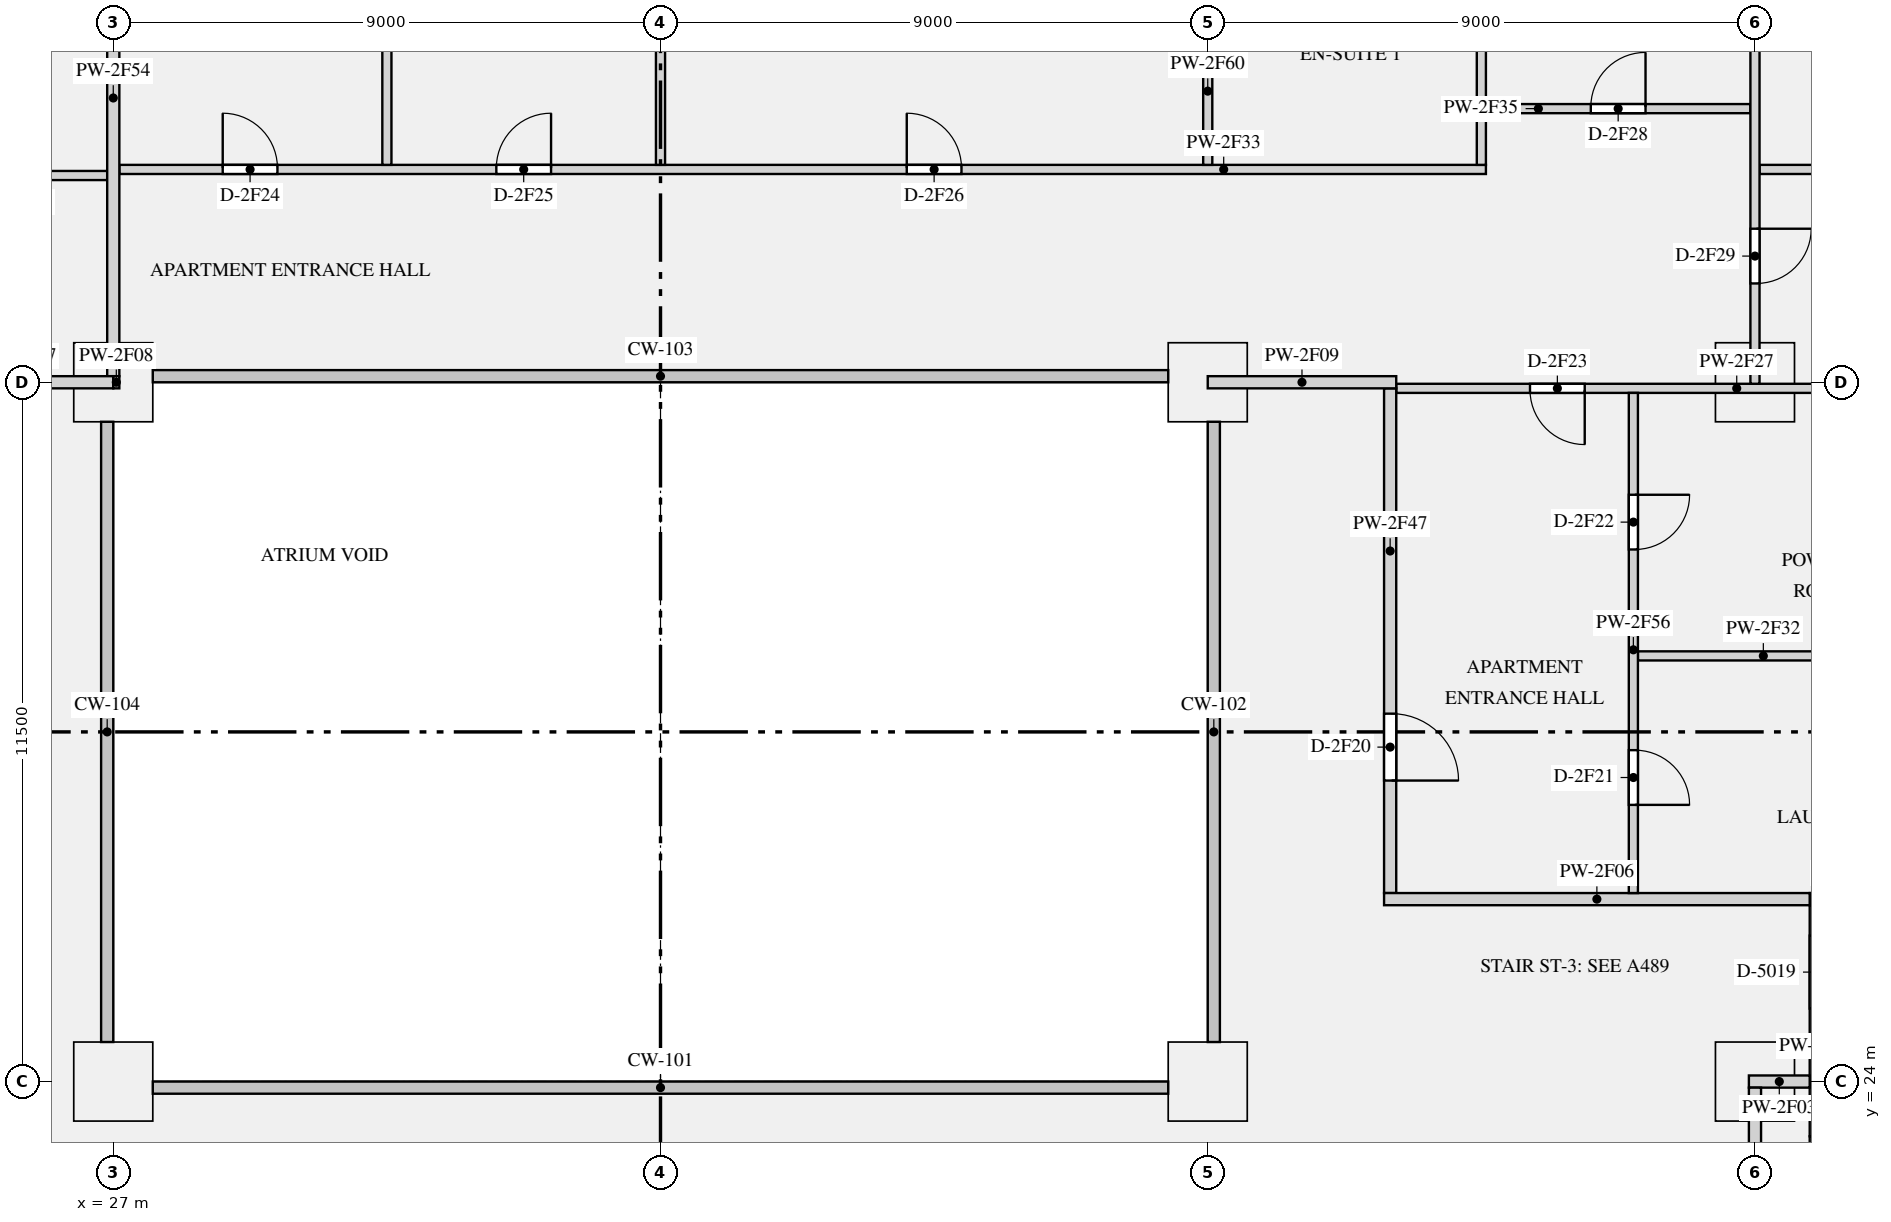
"""IFC4 building model, lengths in metres.
Left out: names, types, materials, properties, quantities, classifications, styles, units other than length and angle.
Written with IfcOpenShell. Run it as: python <this file> out.ifc"""

import sys

from ifc_helpers import new_model, si_unit, direction, frame, frame_2d, origin, origin_2d, place, context, subcontext, project, spatial, rectangle, extrude, element, fill, save


model = new_model("IFC4")
c1 = context("Model", 3, precision=1e-05, world=origin(), true_north=direction((0.0, 1.0)))
c2 = subcontext(c1, "Body", "Model", "MODEL_VIEW")
j1 = project(units=[si_unit("LENGTHUNIT", "METRE"), si_unit("PLANEANGLEUNIT", "RADIAN")], contexts=[c1])
p1 = place(None, origin())
s1 = spatial("IfcSite", under=j1, at=p1, CompositionType="ELEMENT")
p2 = place(p1, origin())
s2 = spatial("IfcBuilding", under=s1, at=p2, CompositionType="ELEMENT")
p3 = place(p2, frame((0.0, 0.0, 127.65)))
s3 = spatial("IfcBuildingStorey", under=s2, at=p3, CompositionType="ELEMENT", Elevation=127.65)
for number, where, z_axis, x_axis in (
    (1, (27.0, 24.0, 0.0), (0.0, 0.0, 1.0), (1.0, 0.0, 0.0)),
    (2, (45.0, 24.0, 0.0), (0.0, 0.0, 1.0), (1.0, 0.0, 0.0)),
    (3, (54.0, 24.0, 0.0), (0.0, 0.0, 1.0), (1.0, 0.0, 0.0)),
    (4, (27.0, 35.5, 0.0), (0.0, 0.0, 1.0), (1.0, 0.0, 0.0)),
    (5, (45.0, 35.5, 0.0), (0.0, 0.0, 1.0), (1.0, 0.0, 0.0)),
    (6, (54.0, 35.5, 0.0), (0.0, 0.0, 1.0), (1.0, 0.0, 0.0)),
):
    element("IfcColumn", number, at=place(p3, frame(where, z_axis=z_axis, x_axis=x_axis)), inside=s3, PredefinedType="COLUMN", context=c2, shape_type="SweptSolid", body=[
        extrude(rectangle(XDim=1.3, YDim=1.3, at=origin_2d()), origin(), (0.0, 0.0, 1.0), 3.15),
    ])
p4 = place(p3, frame((54.9, 23.0, 0.0), z_axis=(0.0, 0.0, 1.0), x_axis=(1.0, 0.0, 0.0)))
e7 = element("IfcWall", 7, at=p4, inside=s3, PredefinedType="PARTITIONING", context=c2, shape_type="SweptSolid", body=[
    extrude(rectangle(XDim=5.0, YDim=0.2, at=frame_2d((2.5, 0.0))), origin(), (0.0, 0.0, 1.0), 2.65),
])
p5 = place(p3, frame((54.9, 27.0, 0.0), z_axis=(0.0, 0.0, 1.0), x_axis=(1.0, 0.0, 0.0)))
e8 = element("IfcWall", 8, at=p5, inside=s3, PredefinedType="PARTITIONING", context=c2, shape_type="SweptSolid", body=[
    extrude(rectangle(XDim=1.3, YDim=0.2, at=frame_2d((0.65, 0.0))), origin(), (0.0, 0.0, 1.0), 2.65),
])
p6 = place(p3, frame((55.0, 23.1, 0.0), z_axis=(0.0, 0.0, 1.0), x_axis=(0.0, 1.0, 0.0)))
e9 = element("IfcWall", 9, at=p6, inside=s3, PredefinedType="PARTITIONING", context=c2, shape_type="SweptSolid", body=[
    extrude(rectangle(XDim=3.8, YDim=0.2, at=frame_2d((1.9, 0.0))), origin(), (0.0, 0.0, 1.0), 2.65),
])
p7 = place(p6, frame((2.1, 0.0, 0.0)))
e10 = element("IfcOpeningElement", 10, at=p7, cuts=e9, PredefinedType="OPENING", context=c2, shape_type="SweptSolid", body=[
    extrude(rectangle(XDim=1.2, YDim=2.1, at=frame_2d((0.6, 1.05))), frame((0.0, 0.11, 0.0), z_axis=(0.0, -1.0, 0.0), x_axis=(1.0, 0.0, 0.0)), (0.0, 0.0, 1.0), 0.22),
])
p8 = place(p3, frame((53.9, 24.0, 0.0), z_axis=(0.0, 0.0, 1.0), x_axis=(1.0, 0.0, 0.0)))
e11 = element("IfcWall", 11, at=p8, inside=s3, PredefinedType="PARTITIONING", context=c2, shape_type="SweptSolid", body=[
    extrude(rectangle(XDim=1.0, YDim=0.2, at=frame_2d((0.5, 0.0))), origin(), (0.0, 0.0, 1.0), 2.65),
])
p9 = place(p3, frame((47.9, 27.0, 0.0), z_axis=(0.0, 0.0, 1.0), x_axis=(1.0, 0.0, 0.0)))
e12 = element("IfcWall", 12, at=p9, inside=s3, PredefinedType="PARTITIONING", context=c2, shape_type="SweptSolid", body=[
    extrude(rectangle(XDim=7.0, YDim=0.2, at=frame_2d((3.5, 0.0))), origin(), (0.0, 0.0, 1.0), 2.65),
])
p10 = place(p3, frame((23.9, 35.5, 0.0), z_axis=(0.0, 0.0, 1.0), x_axis=(1.0, 0.0, 0.0)))
e13 = element("IfcWall", 13, at=p10, inside=s3, PredefinedType="PARTITIONING", context=c2, shape_type="SweptSolid", body=[
    extrude(rectangle(XDim=3.1, YDim=0.2, at=frame_2d((1.55, 0.0))), origin(), (0.0, 0.0, 1.0), 2.65),
])
p11 = place(p3, frame((27.0, 35.5, 0.0), z_axis=(0.0, 0.0, 1.0), x_axis=(1.0, 0.0, 0.0)))
e14 = element("IfcWall", 14, at=p11, inside=s3, PredefinedType="PARTITIONING", context=c2, shape_type="SweptSolid", body=[
    extrude(rectangle(XDim=0.1, YDim=0.2, at=frame_2d((0.05, 0.0))), origin(), (0.0, 0.0, 1.0), 2.65),
])
p12 = place(p3, frame((45.0, 35.5, 0.0), z_axis=(0.0, 0.0, 1.0), x_axis=(1.0, 0.0, 0.0)))
e15 = element("IfcWall", 15, at=p12, inside=s3, PredefinedType="PARTITIONING", context=c2, shape_type="SweptSolid", body=[
    extrude(rectangle(XDim=3.1, YDim=0.2, at=frame_2d((1.55, 0.0))), origin(), (0.0, 0.0, 1.0), 2.65),
])
p13 = place(p3, frame((12.125, 38.9, 0.0), z_axis=(0.0, 0.0, 1.0), x_axis=(1.0, 0.0, 0.0)))
e16 = element("IfcWall", 16, at=p13, inside=s3, PredefinedType="PARTITIONING", context=c2, shape_type="SweptSolid", body=[
    extrude(rectangle(XDim=14.775, YDim=0.15, at=frame_2d((7.387, 0.0))), origin(), (0.0, 0.0, 1.0), 2.65),
])
p14 = place(p13, frame((3.175, 0.0, 0.0)))
e17 = element("IfcOpeningElement", 17, at=p14, cuts=e16, PredefinedType="OPENING", context=c2, shape_type="SweptSolid", body=[
    extrude(rectangle(XDim=0.9, YDim=2.1, at=frame_2d((0.45, 1.05))), frame((0.0, 0.085, 0.0), z_axis=(0.0, -1.0, 0.0), x_axis=(1.0, 0.0, 0.0)), (0.0, 0.0, 1.0), 0.17),
])
p15 = place(p13, frame((12.925, 0.0, 0.0)))
e18 = element("IfcOpeningElement", 18, at=p15, cuts=e16, PredefinedType="OPENING", context=c2, shape_type="SweptSolid", body=[
    extrude(rectangle(XDim=0.9, YDim=2.1, at=frame_2d((0.45, 1.05))), frame((0.0, 0.085, 0.0), z_axis=(0.0, -1.0, 0.0), x_axis=(1.0, 0.0, 0.0)), (0.0, 0.0, 1.0), 0.17),
])
p16 = place(p3, frame((48.1, 35.4, 0.0), z_axis=(0.0, 0.0, 1.0), x_axis=(1.0, 0.0, 0.0)))
e19 = element("IfcWall", 19, at=p16, inside=s3, PredefinedType="PARTITIONING", context=c2, shape_type="SweptSolid", body=[
    extrude(rectangle(XDim=8.1, YDim=0.15, at=frame_2d((4.05, 0.0))), origin(), (0.0, 0.0, 1.0), 2.65),
])
p17 = place(p16, frame((2.2, 0.0, 0.0)))
e20 = element("IfcOpeningElement", 20, at=p17, cuts=e19, PredefinedType="OPENING", context=c2, shape_type="SweptSolid", body=[
    extrude(rectangle(XDim=0.9, YDim=2.1, at=frame_2d((0.45, 1.05))), frame((0.0, 0.085, 0.0), z_axis=(0.0, -1.0, 0.0), x_axis=(1.0, 0.0, 0.0)), (0.0, 0.0, 1.0), 0.17),
])
p18 = place(p3, frame((52.075, 31.0, 0.0), z_axis=(0.0, 0.0, 1.0), x_axis=(1.0, 0.0, 0.0)))
e21 = element("IfcWall", 21, at=p18, inside=s3, PredefinedType="PARTITIONING", context=c2, shape_type="SweptSolid", body=[
    extrude(rectangle(XDim=4.125, YDim=0.15, at=frame_2d((2.062, 0.0))), origin(), (0.0, 0.0, 1.0), 2.65),
])
p19 = place(p3, frame((27.1, 39.0, 0.0), z_axis=(0.0, 0.0, 1.0), x_axis=(1.0, 0.0, 0.0)))
e22 = element("IfcWall", 22, at=p19, inside=s3, PredefinedType="PARTITIONING", context=c2, shape_type="SweptSolid", body=[
    extrude(rectangle(XDim=22.475, YDim=0.15, at=frame_2d((11.237, 0.0))), origin(), (0.0, 0.0, 1.0), 2.65),
])
p20 = place(p19, frame((1.7, 0.0, 0.0)))
e23 = element("IfcOpeningElement", 23, at=p20, cuts=e22, PredefinedType="OPENING", context=c2, shape_type="SweptSolid", body=[
    extrude(rectangle(XDim=0.9, YDim=2.1, at=frame_2d((0.45, 1.05))), frame((0.0, 0.085, 0.0), z_axis=(0.0, -1.0, 0.0), x_axis=(1.0, 0.0, 0.0)), (0.0, 0.0, 1.0), 0.17),
])
p21 = place(p19, frame((6.2, 0.0, 0.0)))
e24 = element("IfcOpeningElement", 24, at=p21, cuts=e22, PredefinedType="OPENING", context=c2, shape_type="SweptSolid", body=[
    extrude(rectangle(XDim=0.9, YDim=2.1, at=frame_2d((0.45, 1.05))), frame((0.0, 0.085, 0.0), z_axis=(0.0, -1.0, 0.0), x_axis=(1.0, 0.0, 0.0)), (0.0, 0.0, 1.0), 0.17),
])
p22 = place(p19, frame((12.95, 0.0, 0.0)))
e25 = element("IfcOpeningElement", 25, at=p22, cuts=e22, PredefinedType="OPENING", context=c2, shape_type="SweptSolid", body=[
    extrude(rectangle(XDim=0.9, YDim=2.1, at=frame_2d((0.45, 1.05))), frame((0.0, 0.085, 0.0), z_axis=(0.0, -1.0, 0.0), x_axis=(1.0, 0.0, 0.0)), (0.0, 0.0, 1.0), 0.17),
])
p23 = place(p3, frame((54.075, 39.0, 0.0), z_axis=(0.0, 0.0, 1.0), x_axis=(1.0, 0.0, 0.0)))
e26 = element("IfcWall", 26, at=p23, inside=s3, PredefinedType="PARTITIONING", context=c2, shape_type="SweptSolid", body=[
    extrude(rectangle(XDim=8.85, YDim=0.15, at=frame_2d((4.425, 0.0))), origin(), (0.0, 0.0, 1.0), 2.65),
])
p24 = place(p23, frame((3.975, 0.0, 0.0)))
e27 = element("IfcOpeningElement", 27, at=p24, cuts=e26, PredefinedType="OPENING", context=c2, shape_type="SweptSolid", body=[
    extrude(rectangle(XDim=0.9, YDim=2.1, at=frame_2d((0.45, 1.05))), frame((0.0, 0.085, 0.0), z_axis=(0.0, -1.0, 0.0), x_axis=(1.0, 0.0, 0.0)), (0.0, 0.0, 1.0), 0.17),
])
p25 = place(p3, frame((49.575, 40.0, 0.0), z_axis=(0.0, 0.0, 1.0), x_axis=(1.0, 0.0, 0.0)))
e28 = element("IfcWall", 28, at=p25, inside=s3, PredefinedType="PARTITIONING", context=c2, shape_type="SweptSolid", body=[
    extrude(rectangle(XDim=4.35, YDim=0.15, at=frame_2d((2.175, 0.0))), origin(), (0.0, 0.0, 1.0), 2.65),
])
p26 = place(p25, frame((1.725, 0.0, 0.0)))
e29 = element("IfcOpeningElement", 29, at=p26, cuts=e28, PredefinedType="OPENING", context=c2, shape_type="SweptSolid", body=[
    extrude(rectangle(XDim=0.9, YDim=2.1, at=frame_2d((0.45, 1.05))), frame((0.0, 0.085, 0.0), z_axis=(0.0, -1.0, 0.0), x_axis=(1.0, 0.0, 0.0)), (0.0, 0.0, 1.0), 0.17),
])
p27 = place(p3, frame((54.0, 35.475, 0.0), z_axis=(0.0, 0.0, 1.0), x_axis=(0.0, 1.0, 0.0)))
e30 = element("IfcWall", 30, at=p27, inside=s3, PredefinedType="PARTITIONING", context=c2, shape_type="SweptSolid", body=[
    extrude(rectangle(XDim=9.275, YDim=0.15, at=frame_2d((4.637, 0.0))), origin(), (0.0, 0.0, 1.0), 2.65),
])
p28 = place(p27, frame((1.65, 0.0, 0.0)))
e31 = element("IfcOpeningElement", 31, at=p28, cuts=e30, PredefinedType="OPENING", context=c2, shape_type="SweptSolid", body=[
    extrude(rectangle(XDim=0.9, YDim=2.1, at=frame_2d((0.45, 1.05))), frame((0.0, 0.085, 0.0), z_axis=(0.0, -1.0, 0.0), x_axis=(1.0, 0.0, 0.0)), (0.0, 0.0, 1.0), 0.17),
])
p29 = place(p3, frame((54.0, 16.1, 0.0), z_axis=(0.0, 0.0, 1.0), x_axis=(0.0, 1.0, 0.0)))
e32 = element("IfcWall", 32, at=p29, inside=s3, PredefinedType="PARTITIONING", context=c2, shape_type="SweptSolid", body=[
    extrude(rectangle(XDim=7.8, YDim=0.2, at=frame_2d((3.9, 0.0))), origin(), (0.0, 0.0, 1.0), 2.65),
])
p30 = place(p29, frame((2.35, 0.0, 0.0)))
e33 = element("IfcOpeningElement", 33, at=p30, cuts=e32, PredefinedType="OPENING", context=c2, shape_type="SweptSolid", body=[
    extrude(rectangle(XDim=1.1, YDim=2.1, at=frame_2d((0.55, 1.05))), frame((0.0, 0.11, 0.0), z_axis=(0.0, -1.0, 0.0), x_axis=(1.0, 0.0, 0.0)), (0.0, 0.0, 1.0), 0.22),
])
p31 = place(p3, frame((48.0, 27.1, 0.0), z_axis=(0.0, 0.0, 1.0), x_axis=(0.0, 1.0, 0.0)))
e34 = element("IfcWall", 34, at=p31, inside=s3, PredefinedType="PARTITIONING", context=c2, shape_type="SweptSolid", body=[
    extrude(rectangle(XDim=8.3, YDim=0.2, at=frame_2d((4.15, 0.0))), origin(), (0.0, 0.0, 1.0), 2.65),
])
p32 = place(p31, frame((1.85, 0.0, 0.0)))
e35 = element("IfcOpeningElement", 35, at=p32, cuts=e34, PredefinedType="OPENING", context=c2, shape_type="SweptSolid", body=[
    extrude(rectangle(XDim=1.1, YDim=2.1, at=frame_2d((0.55, 1.05))), frame((0.0, 0.11, 0.0), z_axis=(0.0, -1.0, 0.0), x_axis=(1.0, 0.0, 0.0)), (0.0, 0.0, 1.0), 0.22),
])
p33 = place(p3, frame((27.0, 35.6, 0.0), z_axis=(0.0, 0.0, 1.0), x_axis=(0.0, 1.0, 0.0)))
e36 = element("IfcWall", 36, at=p33, inside=s3, PredefinedType="PARTITIONING", context=c2, shape_type="SweptSolid", body=[
    extrude(rectangle(XDim=9.15, YDim=0.2, at=frame_2d((4.575, 0.0))), origin(), (0.0, 0.0, 1.0), 2.65),
])
p34 = place(p3, frame((52.0, 27.1, 0.0), z_axis=(0.0, 0.0, 1.0), x_axis=(0.0, 1.0, 0.0)))
e37 = element("IfcWall", 37, at=p34, inside=s3, PredefinedType="PARTITIONING", context=c2, shape_type="SweptSolid", body=[
    extrude(rectangle(XDim=8.225, YDim=0.15, at=frame_2d((4.112, 0.0))), origin(), (0.0, 0.0, 1.0), 2.65),
])
p35 = place(p34, frame((1.45, 0.0, 0.0)))
e38 = element("IfcOpeningElement", 38, at=p35, cuts=e37, PredefinedType="OPENING", context=c2, shape_type="SweptSolid", body=[
    extrude(rectangle(XDim=0.9, YDim=2.1, at=frame_2d((0.45, 1.05))), frame((0.0, 0.085, 0.0), z_axis=(0.0, -1.0, 0.0), x_axis=(1.0, 0.0, 0.0)), (0.0, 0.0, 1.0), 0.17),
])
p36 = place(p34, frame((5.65, 0.0, 0.0)))
e39 = element("IfcOpeningElement", 39, at=p36, cuts=e37, PredefinedType="OPENING", context=c2, shape_type="SweptSolid", body=[
    extrude(rectangle(XDim=0.9, YDim=2.1, at=frame_2d((0.45, 1.05))), frame((0.0, 0.085, 0.0), z_axis=(0.0, -1.0, 0.0), x_axis=(1.0, 0.0, 0.0)), (0.0, 0.0, 1.0), 0.17),
])
for number, where, z_axis, x_axis in (
    (40, (49.5, 39.075, 0.0), (0.0, 0.0, 1.0), (0.0, 1.0, 0.0)),
    (41, (31.5, 39.075, 0.0), (0.0, 0.0, 1.0), (0.0, 1.0, 0.0)),
    (42, (36.0, 39.075, 0.0), (0.0, 0.0, 1.0), (0.0, 1.0, 0.0)),
):
    element("IfcWall", number, at=place(p3, frame(where, z_axis=z_axis, x_axis=x_axis)), inside=s3, PredefinedType="PARTITIONING", context=c2, shape_type="SweptSolid", body=[
        extrude(rectangle(XDim=5.675, YDim=0.15, at=frame_2d((2.837, 0.0))), origin(), (0.0, 0.0, 1.0), 2.65),
    ])
p37 = place(p3, frame((45.0, 39.075, 0.0), z_axis=(0.0, 0.0, 1.0), x_axis=(0.0, 1.0, 0.0)))
e43 = element("IfcWall", 43, at=p37, inside=s3, PredefinedType="PARTITIONING", context=c2, shape_type="SweptSolid", body=[
    extrude(rectangle(XDim=5.675, YDim=0.15, at=frame_2d((2.837, 0.0))), origin(), (0.0, 0.0, 1.0), 2.65),
])
p38 = place(p37, frame((2.425, 0.0, 0.0)))
e44 = element("IfcOpeningElement", 44, at=p38, cuts=e43, PredefinedType="OPENING", context=c2, shape_type="SweptSolid", body=[
    extrude(rectangle(XDim=0.9, YDim=2.1, at=frame_2d((0.45, 1.05))), frame((0.0, 0.085, 0.0), z_axis=(0.0, -1.0, 0.0), x_axis=(1.0, 0.0, 0.0)), (0.0, 0.0, 1.0), 0.17),
])
p39 = place(p32, frame((1.1, 0.0, 0.0), z_axis=(0.0, 0.0, 1.0), x_axis=(-1.0, 0.0, 0.0)))
e45 = element("IfcDoor", 45, at=p39, inside=s3, OperationType="SINGLE_SWING_RIGHT", PredefinedType="DOOR", context=c2, shape_type="SweptSolid", body=[
    extrude(rectangle(XDim=1.1, YDim=2.1, at=frame_2d((0.55, 1.05))), frame((0.0, 0.025, 0.0), z_axis=(0.0, -1.0, 0.0), x_axis=(1.0, 0.0, 0.0)), (0.0, 0.0, 1.0), 0.05),
])
fill(e35, e45)
p40 = place(p35, frame((0.9, 0.0, 0.0), z_axis=(0.0, 0.0, 1.0), x_axis=(-1.0, 0.0, 0.0)))
e46 = element("IfcDoor", 46, at=p40, inside=s3, OperationType="SINGLE_SWING_RIGHT", PredefinedType="DOOR", context=c2, shape_type="SweptSolid", body=[
    extrude(rectangle(XDim=0.9, YDim=2.1, at=frame_2d((0.45, 1.05))), frame((0.0, 0.025, 0.0), z_axis=(0.0, -1.0, 0.0), x_axis=(1.0, 0.0, 0.0)), (0.0, 0.0, 1.0), 0.05),
])
fill(e38, e46)
p41 = place(p36, frame((0.9, 0.0, 0.0), z_axis=(0.0, 0.0, 1.0), x_axis=(-1.0, 0.0, 0.0)))
e47 = element("IfcDoor", 47, at=p41, inside=s3, OperationType="SINGLE_SWING_LEFT", PredefinedType="DOOR", context=c2, shape_type="SweptSolid", body=[
    extrude(rectangle(XDim=0.9, YDim=2.1, at=frame_2d((0.45, 1.05))), frame((0.0, 0.025, 0.0), z_axis=(0.0, -1.0, 0.0), x_axis=(1.0, 0.0, 0.0)), (0.0, 0.0, 1.0), 0.05),
])
fill(e39, e47)
p42 = place(p17, frame((0.9, 0.0, 0.0), z_axis=(0.0, 0.0, 1.0), x_axis=(-1.0, 0.0, 0.0)))
e48 = element("IfcDoor", 48, at=p42, inside=s3, OperationType="SINGLE_SWING_LEFT", PredefinedType="DOOR", context=c2, shape_type="SweptSolid", body=[
    extrude(rectangle(XDim=0.9, YDim=2.1, at=frame_2d((0.45, 1.05))), frame((0.0, 0.025, 0.0), z_axis=(0.0, -1.0, 0.0), x_axis=(1.0, 0.0, 0.0)), (0.0, 0.0, 1.0), 0.05),
])
fill(e20, e48)
p43 = place(p20, origin())
e49 = element("IfcDoor", 49, at=p43, inside=s3, OperationType="SINGLE_SWING_LEFT", PredefinedType="DOOR", context=c2, shape_type="SweptSolid", body=[
    extrude(rectangle(XDim=0.9, YDim=2.1, at=frame_2d((0.45, 1.05))), frame((0.0, 0.025, 0.0), z_axis=(0.0, -1.0, 0.0), x_axis=(1.0, 0.0, 0.0)), (0.0, 0.0, 1.0), 0.05),
])
fill(e23, e49)
p44 = place(p21, origin())
e50 = element("IfcDoor", 50, at=p44, inside=s3, OperationType="SINGLE_SWING_RIGHT", PredefinedType="DOOR", context=c2, shape_type="SweptSolid", body=[
    extrude(rectangle(XDim=0.9, YDim=2.1, at=frame_2d((0.45, 1.05))), frame((0.0, 0.025, 0.0), z_axis=(0.0, -1.0, 0.0), x_axis=(1.0, 0.0, 0.0)), (0.0, 0.0, 1.0), 0.05),
])
fill(e24, e50)
p45 = place(p22, origin())
e51 = element("IfcDoor", 51, at=p45, inside=s3, OperationType="SINGLE_SWING_LEFT", PredefinedType="DOOR", context=c2, shape_type="SweptSolid", body=[
    extrude(rectangle(XDim=0.9, YDim=2.1, at=frame_2d((0.45, 1.05))), frame((0.0, 0.025, 0.0), z_axis=(0.0, -1.0, 0.0), x_axis=(1.0, 0.0, 0.0)), (0.0, 0.0, 1.0), 0.05),
])
fill(e25, e51)
p46 = place(p26, origin())
e52 = element("IfcDoor", 52, at=p46, inside=s3, OperationType="SINGLE_SWING_RIGHT", PredefinedType="DOOR", context=c2, shape_type="SweptSolid", body=[
    extrude(rectangle(XDim=0.9, YDim=2.1, at=frame_2d((0.45, 1.05))), frame((0.0, 0.025, 0.0), z_axis=(0.0, -1.0, 0.0), x_axis=(1.0, 0.0, 0.0)), (0.0, 0.0, 1.0), 0.05),
])
fill(e29, e52)
p47 = place(p28, frame((0.9, 0.0, 0.0), z_axis=(0.0, 0.0, 1.0), x_axis=(-1.0, 0.0, 0.0)))
e53 = element("IfcDoor", 53, at=p47, inside=s3, OperationType="SINGLE_SWING_LEFT", PredefinedType="DOOR", context=c2, shape_type="SweptSolid", body=[
    extrude(rectangle(XDim=0.9, YDim=2.1, at=frame_2d((0.45, 1.05))), frame((0.0, 0.025, 0.0), z_axis=(0.0, -1.0, 0.0), x_axis=(1.0, 0.0, 0.0)), (0.0, 0.0, 1.0), 0.05),
])
fill(e31, e53)
save(model, sys.argv[1])
